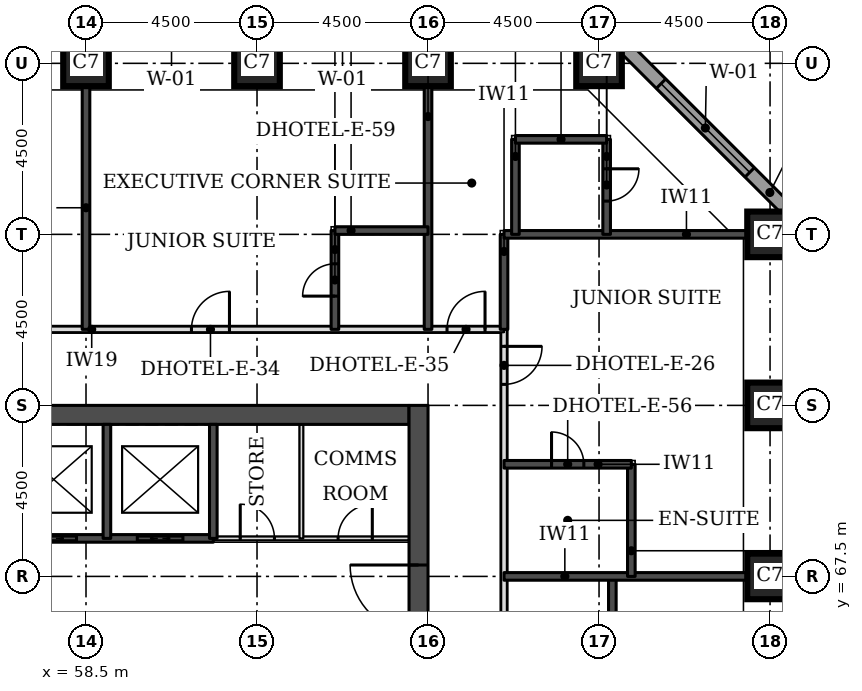
"""IFC4 building model, lengths in metres.
Left out: names, types, materials, properties, quantities, classifications, styles, units other than length and angle.
Written with IfcOpenShell. Run it as: python <this file> out.ifc"""

import sys

from ifc_helpers import new_model, si_unit, direction, frame, frame_2d, origin, origin_2d, place, context, subcontext, project, spatial, rectangle, extrude, element, fill, save


model = new_model("IFC4")
c1 = context("Model", 3, precision=1e-05, world=origin(), true_north=direction((0.0, 1.0)))
c2 = subcontext(c1, "Body", "Model", "MODEL_VIEW")
j1 = project(units=[si_unit("LENGTHUNIT", "METRE"), si_unit("PLANEANGLEUNIT", "RADIAN")], contexts=[c1])
p1 = place(None, origin())
s1 = spatial("IfcSite", under=j1, at=p1, CompositionType="ELEMENT")
p2 = place(p1, origin())
s2 = spatial("IfcBuilding", under=s1, at=p2, CompositionType="ELEMENT")
p3 = place(p2, frame((0.0, 0.0, 62.7)))
s3 = spatial("IfcBuildingStorey", under=s2, at=p3, CompositionType="ELEMENT", Elevation=62.7)
for number, where, z_axis, x_axis in (
    (1, (76.5, 67.5, 0.0), (0.0, 0.0, 1.0), (1.0, 0.0, 0.0)),
    (2, (76.5, 72.0, 0.0), (0.0, 0.0, 1.0), (1.0, 0.0, 0.0)),
    (3, (76.5, 76.5, 0.0), (0.0, 0.0, 1.0), (1.0, 0.0, 0.0)),
    (4, (58.5, 81.0, 0.0), (0.0, 0.0, 1.0), (1.0, 0.0, 0.0)),
    (5, (63.0, 81.0, 0.0), (0.0, 0.0, 1.0), (1.0, 0.0, 0.0)),
    (6, (67.5, 81.0, 0.0), (0.0, 0.0, 1.0), (1.0, 0.0, 0.0)),
    (7, (72.0, 81.0, 0.0), (0.0, 0.0, 1.0), (1.0, 0.0, 0.0)),
):
    element("IfcColumn", number, at=place(p3, frame(where, z_axis=z_axis, x_axis=x_axis)), inside=s3, PredefinedType="COLUMN", context=c2, shape_type="SweptSolid", body=[
        extrude(rectangle(XDim=1.2, YDim=1.2, at=origin_2d()), origin(), (0.0, 0.0, 1.0), 3.3),
    ])
p4 = place(p3, frame((45.5, 71.75, 0.0), z_axis=(0.0, 0.0, 1.0), x_axis=(1.0, 0.0, 0.0)))
e8 = element("IfcWall", 8, at=p4, inside=s3, PredefinedType="SHEAR", context=c2, shape_type="SweptSolid", body=[
    extrude(rectangle(XDim=21.5, YDim=0.5, at=frame_2d((10.75, 0.0))), origin(), (0.0, 0.0, 1.0), 3.3),
])
p5 = place(p3, frame((67.25, 49.5, 0.0), z_axis=(0.0, 0.0, 1.0), x_axis=(0.0, 1.0, 0.0)))
e9 = element("IfcWall", 9, at=p5, inside=s3, PredefinedType="SHEAR", context=c2, shape_type="SweptSolid", body=[
    extrude(rectangle(XDim=22.5, YDim=0.5, at=frame_2d((11.25, 0.0))), origin(), (0.0, 0.0, 1.0), 3.3),
])
p6 = place(p5, frame((4.2, 0.0, 0.0)))
e10 = element("IfcOpeningElement", 10, at=p6, cuts=e9, PredefinedType="OPENING", context=c2, shape_type="SweptSolid", body=[
    extrude(rectangle(XDim=1.8, YDim=2.1, at=frame_2d((0.9, 1.05))), frame((0.0, 0.26, 0.0), z_axis=(0.0, -1.0, 0.0), x_axis=(1.0, 0.0, 0.0)), (0.0, 0.0, 1.0), 0.52),
])
p7 = place(p5, frame((6.9, 0.0, 0.0)))
e11 = element("IfcOpeningElement", 11, at=p7, cuts=e9, PredefinedType="OPENING", context=c2, shape_type="SweptSolid", body=[
    extrude(rectangle(XDim=1.1, YDim=2.1, at=frame_2d((0.55, 1.05))), frame((0.0, 0.26, 0.0), z_axis=(0.0, -1.0, 0.0), x_axis=(1.0, 0.0, 0.0)), (0.0, 0.0, 1.0), 0.52),
])
p8 = place(p5, frame((13.6, 0.0, 0.0)))
e12 = element("IfcOpeningElement", 12, at=p8, cuts=e9, PredefinedType="OPENING", context=c2, shape_type="SweptSolid", body=[
    extrude(rectangle(XDim=1.1, YDim=2.1, at=frame_2d((0.55, 1.05))), frame((0.0, 0.26, 0.0), z_axis=(0.0, -1.0, 0.0), x_axis=(1.0, 0.0, 0.0)), (0.0, 0.0, 1.0), 0.52),
])
p9 = place(p5, frame((16.5, 0.0, 0.0)))
e13 = element("IfcOpeningElement", 13, at=p9, cuts=e9, PredefinedType="OPENING", context=c2, shape_type="SweptSolid", body=[
    extrude(rectangle(XDim=1.8, YDim=2.1, at=frame_2d((0.9, 1.05))), frame((0.0, 0.26, 0.0), z_axis=(0.0, -1.0, 0.0), x_axis=(1.0, 0.0, 0.0)), (0.0, 0.0, 1.0), 0.52),
])
p10 = place(p3, frame((77.326, 76.77, 0.0), z_axis=(0.0, 0.0, 1.0), x_axis=(-0.707106781187, 0.707106781187, 0.0)))
e14 = element("IfcWall", 14, at=p10, inside=s3, PredefinedType="STANDARD", context=c2, shape_type="SweptSolid", body=[
    extrude(rectangle(XDim=7.151, YDim=0.35, at=frame_2d((3.576, 0.0))), origin(), (0.0, 0.0, 1.0), 3.055),
])
p11 = place(p10, frame((1.926, 0.0, 0.8)))
e15 = element("IfcOpeningElement", 15, at=p11, cuts=e14, PredefinedType="OPENING", context=c2, shape_type="SweptSolid", body=[
    extrude(rectangle(XDim=3.3, YDim=1.5, at=frame_2d((1.65, 0.75))), frame((0.0, 0.185, 0.0), z_axis=(0.0, -1.0, 0.0), x_axis=(1.0, 0.0, 0.0)), (0.0, 0.0, 1.0), 0.37),
])
p12 = place(p3, frame((69.5, 47.5, 0.0), z_axis=(0.0, 0.0, 1.0), x_axis=(0.0, 1.0, 0.0)))
e16 = element("IfcWall", 16, at=p12, inside=s3, PredefinedType="PARTITIONING", context=c2, shape_type="SweptSolid", body=[
    extrude(rectangle(XDim=26.5, YDim=0.15, at=frame_2d((13.25, 0.0))), origin(), (0.0, 0.0, 1.0), 3.08),
])
p13 = place(p12, frame((25.053, 0.0, 0.0)))
e17 = element("IfcOpeningElement", 17, at=p13, cuts=e16, PredefinedType="OPENING", context=c2, shape_type="SweptSolid", body=[
    extrude(rectangle(XDim=1.0, YDim=2.1, at=frame_2d((0.5, 1.05))), frame((0.0, 0.085, 0.0), z_axis=(0.0, -1.0, 0.0), x_axis=(1.0, 0.0, 0.0)), (0.0, 0.0, 1.0), 0.17),
])
p14 = place(p12, frame((13.775, 0.0, 0.0)))
e18 = element("IfcOpeningElement", 18, at=p14, cuts=e16, PredefinedType="OPENING", context=c2, shape_type="SweptSolid", body=[
    extrude(rectangle(XDim=1.0, YDim=2.1, at=frame_2d((0.5, 1.05))), frame((0.0, 0.085, 0.0), z_axis=(0.0, -1.0, 0.0), x_axis=(1.0, 0.0, 0.0)), (0.0, 0.0, 1.0), 0.17),
])
p15 = place(p12, frame((7.65, 0.0, 0.0)))
e19 = element("IfcOpeningElement", 19, at=p15, cuts=e16, PredefinedType="OPENING", context=c2, shape_type="SweptSolid", body=[
    extrude(rectangle(XDim=1.1, YDim=2.1, at=frame_2d((0.55, 1.05))), frame((0.0, 0.085, 0.0), z_axis=(0.0, -1.0, 0.0), x_axis=(1.0, 0.0, 0.0)), (0.0, 0.0, 1.0), 0.17),
])
p16 = place(p12, frame((0.447, 0.0, 0.0)))
e20 = element("IfcOpeningElement", 20, at=p16, cuts=e16, PredefinedType="OPENING", context=c2, shape_type="SweptSolid", body=[
    extrude(rectangle(XDim=1.0, YDim=2.1, at=frame_2d((0.5, 1.05))), frame((0.0, 0.085, 0.0), z_axis=(0.0, -1.0, 0.0), x_axis=(1.0, 0.0, 0.0)), (0.0, 0.0, 1.0), 0.17),
])
p17 = place(p3, frame((43.0, 74.0, 0.0), z_axis=(0.0, 0.0, 1.0), x_axis=(1.0, 0.0, 0.0)))
e21 = element("IfcWall", 21, at=p17, inside=s3, PredefinedType="PARTITIONING", context=c2, shape_type="SweptSolid", body=[
    extrude(rectangle(XDim=26.5, YDim=0.15, at=frame_2d((13.25, 0.0))), origin(), (0.0, 0.0, 1.0), 3.08),
])
p18 = place(p17, frame((2.825, 0.0, 0.0)))
e22 = element("IfcOpeningElement", 22, at=p18, cuts=e21, PredefinedType="OPENING", context=c2, shape_type="SweptSolid", body=[
    extrude(rectangle(XDim=1.0, YDim=2.1, at=frame_2d((0.5, 1.05))), frame((0.0, 0.085, 0.0), z_axis=(0.0, -1.0, 0.0), x_axis=(1.0, 0.0, 0.0)), (0.0, 0.0, 1.0), 0.17),
])
p19 = place(p17, frame((11.975, 0.0, 0.0)))
e23 = element("IfcOpeningElement", 23, at=p19, cuts=e21, PredefinedType="OPENING", context=c2, shape_type="SweptSolid", body=[
    extrude(rectangle(XDim=1.0, YDim=2.1, at=frame_2d((0.5, 1.05))), frame((0.0, 0.085, 0.0), z_axis=(0.0, -1.0, 0.0), x_axis=(1.0, 0.0, 0.0)), (0.0, 0.0, 1.0), 0.17),
])
p20 = place(p17, frame((18.275, 0.0, 0.0)))
e24 = element("IfcOpeningElement", 24, at=p20, cuts=e21, PredefinedType="OPENING", context=c2, shape_type="SweptSolid", body=[
    extrude(rectangle(XDim=1.0, YDim=2.1, at=frame_2d((0.5, 1.05))), frame((0.0, 0.085, 0.0), z_axis=(0.0, -1.0, 0.0), x_axis=(1.0, 0.0, 0.0)), (0.0, 0.0, 1.0), 0.17),
])
p21 = place(p17, frame((0.5, 0.0, 0.0)))
e25 = element("IfcOpeningElement", 25, at=p21, cuts=e21, PredefinedType="OPENING", context=c2, shape_type="SweptSolid", body=[
    extrude(rectangle(XDim=1.0, YDim=2.1, at=frame_2d((0.5, 1.05))), frame((0.0, 0.085, 0.0), z_axis=(0.0, -1.0, 0.0), x_axis=(1.0, 0.0, 0.0)), (0.0, 0.0, 1.0), 0.17),
])
p22 = place(p17, frame((25.0, 0.0, 0.0)))
e26 = element("IfcOpeningElement", 26, at=p22, cuts=e21, PredefinedType="OPENING", context=c2, shape_type="SweptSolid", body=[
    extrude(rectangle(XDim=1.0, YDim=2.1, at=frame_2d((0.5, 1.05))), frame((0.0, 0.085, 0.0), z_axis=(0.0, -1.0, 0.0), x_axis=(1.0, 0.0, 0.0)), (0.0, 0.0, 1.0), 0.17),
])
p23 = place(p3, frame((72.35, 65.05, 0.0), z_axis=(0.0, 0.0, 1.0), x_axis=(0.0, 1.0, 0.0)))
e27 = element("IfcWall", 27, at=p23, inside=s3, PredefinedType="SOLIDWALL", context=c2, shape_type="SweptSolid", body=[
    extrude(rectangle(XDim=2.45, YDim=0.2, at=frame_2d((1.225, 0.0))), origin(), (0.0, 0.0, 1.0), 3.08),
])
p24 = place(p3, frame((69.5, 67.5, 0.0), z_axis=(0.0, 0.0, 1.0), x_axis=(1.0, 0.0, 0.0)))
e28 = element("IfcWall", 28, at=p24, inside=s3, PredefinedType="SOLIDWALL", context=c2, shape_type="SweptSolid", body=[
    extrude(rectangle(XDim=6.4, YDim=0.2, at=frame_2d((3.2, 0.0))), origin(), (0.0, 0.0, 1.0), 3.08),
])
p25 = place(p3, frame((72.85, 67.5, 0.0), z_axis=(0.0, 0.0, 1.0), x_axis=(0.0, 1.0, 0.0)))
e29 = element("IfcWall", 29, at=p25, inside=s3, PredefinedType="SOLIDWALL", context=c2, shape_type="SweptSolid", body=[
    extrude(rectangle(XDim=2.95, YDim=0.2, at=frame_2d((1.475, 0.0))), origin(), (0.0, 0.0, 1.0), 3.08),
])
p26 = place(p3, frame((69.5, 70.45, 0.0), z_axis=(0.0, 0.0, 1.0), x_axis=(1.0, 0.0, 0.0)))
e30 = element("IfcWall", 30, at=p26, inside=s3, PredefinedType="SOLIDWALL", context=c2, shape_type="SweptSolid", body=[
    extrude(rectangle(XDim=3.35, YDim=0.2, at=frame_2d((1.675, 0.0))), origin(), (0.0, 0.0, 1.0), 3.08),
])
p27 = place(p26, frame((1.25, 0.0, 0.0)))
e31 = element("IfcOpeningElement", 31, at=p27, cuts=e30, PredefinedType="OPENING", context=c2, shape_type="SweptSolid", body=[
    extrude(rectangle(XDim=0.85, YDim=2.1, at=frame_2d((0.425, 1.05))), frame((0.0, 0.11, 0.0), z_axis=(0.0, -1.0, 0.0), x_axis=(1.0, 0.0, 0.0)), (0.0, 0.0, 1.0), 0.22),
])
p28 = place(p3, frame((58.5, 74.0, 0.0), z_axis=(0.0, 0.0, 1.0), x_axis=(0.0, 1.0, 0.0)))
e32 = element("IfcWall", 32, at=p28, inside=s3, PredefinedType="SOLIDWALL", context=c2, shape_type="SweptSolid", body=[
    extrude(rectangle(XDim=6.4, YDim=0.2, at=frame_2d((3.2, 0.0))), origin(), (0.0, 0.0, 1.0), 3.08),
])
p29 = place(p3, frame((65.05, 74.0, 0.0), z_axis=(0.0, 0.0, 1.0), x_axis=(0.0, 1.0, 0.0)))
e33 = element("IfcWall", 33, at=p29, inside=s3, PredefinedType="SOLIDWALL", context=c2, shape_type="SweptSolid", body=[
    extrude(rectangle(XDim=2.6, YDim=0.2, at=frame_2d((1.3, 0.0))), origin(), (0.0, 0.0, 1.0), 3.08),
])
p30 = place(p29, frame((0.875, 0.0, 0.0)))
e34 = element("IfcOpeningElement", 34, at=p30, cuts=e33, PredefinedType="OPENING", context=c2, shape_type="SweptSolid", body=[
    extrude(rectangle(XDim=0.85, YDim=2.1, at=frame_2d((0.425, 1.05))), frame((0.0, 0.11, 0.0), z_axis=(0.0, -1.0, 0.0), x_axis=(1.0, 0.0, 0.0)), (0.0, 0.0, 1.0), 0.22),
])
p31 = place(p3, frame((67.5, 74.0, 0.0), z_axis=(0.0, 0.0, 1.0), x_axis=(0.0, 1.0, 0.0)))
e35 = element("IfcWall", 35, at=p31, inside=s3, PredefinedType="SOLIDWALL", context=c2, shape_type="SweptSolid", body=[
    extrude(rectangle(XDim=6.4, YDim=0.2, at=frame_2d((3.2, 0.0))), origin(), (0.0, 0.0, 1.0), 3.08),
])
p32 = place(p3, frame((69.5, 74.0, 0.0), z_axis=(0.0, 0.0, 1.0), x_axis=(0.0, 1.0, 0.0)))
e36 = element("IfcWall", 36, at=p32, inside=s3, PredefinedType="SOLIDWALL", context=c2, shape_type="SweptSolid", body=[
    extrude(rectangle(XDim=2.5, YDim=0.2, at=frame_2d((1.25, 0.0))), origin(), (0.0, 0.0, 1.0), 3.08),
])
p33 = place(p3, frame((69.5, 76.5, 0.0), z_axis=(0.0, 0.0, 1.0), x_axis=(1.0, 0.0, 0.0)))
e37 = element("IfcWall", 37, at=p33, inside=s3, PredefinedType="SOLIDWALL", context=c2, shape_type="SweptSolid", body=[
    extrude(rectangle(XDim=6.4, YDim=0.2, at=frame_2d((3.2, 0.0))), origin(), (0.0, 0.0, 1.0), 3.08),
])
p34 = place(p3, frame((69.8, 76.5, 0.0), z_axis=(0.0, 0.0, 1.0), x_axis=(0.0, 1.0, 0.0)))
e38 = element("IfcWall", 38, at=p34, inside=s3, PredefinedType="SOLIDWALL", context=c2, shape_type="SweptSolid", body=[
    extrude(rectangle(XDim=2.5, YDim=0.2, at=frame_2d((1.25, 0.0))), origin(), (0.0, 0.0, 1.0), 3.08),
])
p35 = place(p3, frame((72.2, 76.5, 0.0), z_axis=(0.0, 0.0, 1.0), x_axis=(0.0, 1.0, 0.0)))
e39 = element("IfcWall", 39, at=p35, inside=s3, PredefinedType="SOLIDWALL", context=c2, shape_type="SweptSolid", body=[
    extrude(rectangle(XDim=2.5, YDim=0.2, at=frame_2d((1.25, 0.0))), origin(), (0.0, 0.0, 1.0), 3.08),
])
p36 = place(p35, frame((0.875, 0.0, 0.0)))
e40 = element("IfcOpeningElement", 40, at=p36, cuts=e39, PredefinedType="OPENING", context=c2, shape_type="SweptSolid", body=[
    extrude(rectangle(XDim=0.85, YDim=2.1, at=frame_2d((0.425, 1.05))), frame((0.0, 0.11, 0.0), z_axis=(0.0, -1.0, 0.0), x_axis=(1.0, 0.0, 0.0)), (0.0, 0.0, 1.0), 0.22),
])
p37 = place(p3, frame((65.05, 76.6, 0.0), z_axis=(0.0, 0.0, 1.0), x_axis=(1.0, 0.0, 0.0)))
e41 = element("IfcWall", 41, at=p37, inside=s3, PredefinedType="SOLIDWALL", context=c2, shape_type="SweptSolid", body=[
    extrude(rectangle(XDim=2.45, YDim=0.2, at=frame_2d((1.225, 0.0))), origin(), (0.0, 0.0, 1.0), 3.08),
])
p38 = place(p3, frame((69.8, 79.0, 0.0), z_axis=(0.0, 0.0, 1.0), x_axis=(1.0, 0.0, 0.0)))
e42 = element("IfcWall", 42, at=p38, inside=s3, PredefinedType="SOLIDWALL", context=c2, shape_type="SweptSolid", body=[
    extrude(rectangle(XDim=2.4, YDim=0.2, at=frame_2d((1.2, 0.0))), origin(), (0.0, 0.0, 1.0), 3.08),
])
p39 = place(p3, frame((61.85, 68.5, 0.0), z_axis=(0.0, 0.0, 1.0), x_axis=(1.0, 0.0, 0.0)))
e43 = element("IfcWall", 43, at=p39, inside=s3, PredefinedType="PARTITIONING", context=c2, shape_type="SweptSolid", body=[
    extrude(rectangle(XDim=5.15, YDim=0.1, at=frame_2d((2.575, 0.0))), origin(), (0.0, 0.0, 1.0), 3.08),
])
p40 = place(p39, frame((3.284, 0.0, 0.0)))
e44 = element("IfcOpeningElement", 44, at=p40, cuts=e43, PredefinedType="OPENING", context=c2, shape_type="SweptSolid", body=[
    extrude(rectangle(XDim=0.9, YDim=2.1, at=frame_2d((0.45, 1.05))), frame((0.0, 0.06, 0.0), z_axis=(0.0, -1.0, 0.0), x_axis=(1.0, 0.0, 0.0)), (0.0, 0.0, 1.0), 0.12),
])
p41 = place(p39, frame((0.709, 0.0, 0.0)))
e45 = element("IfcOpeningElement", 45, at=p41, cuts=e43, PredefinedType="OPENING", context=c2, shape_type="SweptSolid", body=[
    extrude(rectangle(XDim=0.9, YDim=2.1, at=frame_2d((0.45, 1.05))), frame((0.0, 0.06, 0.0), z_axis=(0.0, -1.0, 0.0), x_axis=(1.0, 0.0, 0.0)), (0.0, 0.0, 1.0), 0.12),
])
p42 = place(p3, frame((50.65, 68.5, 0.0), z_axis=(0.0, 0.0, 1.0), x_axis=(1.0, 0.0, 0.0)))
e46 = element("IfcWall", 46, at=p42, inside=s3, PredefinedType="SOLIDWALL", context=c2, shape_type="SweptSolid", body=[
    extrude(rectangle(XDim=11.2, YDim=0.2, at=frame_2d((5.6, 0.0))), origin(), (0.0, 0.0, 1.0), 3.08),
])
p43 = place(p42, frame((0.8, 0.0, 0.0)))
e47 = element("IfcOpeningElement", 47, at=p43, cuts=e46, PredefinedType="OPENING", context=c2, shape_type="SweptSolid", body=[
    extrude(rectangle(XDim=1.2, YDim=2.1, at=frame_2d((0.6, 1.05))), frame((0.0, 0.11, 0.0), z_axis=(0.0, -1.0, 0.0), x_axis=(1.0, 0.0, 0.0)), (0.0, 0.0, 1.0), 0.22),
])
p44 = place(p42, frame((3.6, 0.0, 0.0)))
e48 = element("IfcOpeningElement", 48, at=p44, cuts=e46, PredefinedType="OPENING", context=c2, shape_type="SweptSolid", body=[
    extrude(rectangle(XDim=1.2, YDim=2.1, at=frame_2d((0.6, 1.05))), frame((0.0, 0.11, 0.0), z_axis=(0.0, -1.0, 0.0), x_axis=(1.0, 0.0, 0.0)), (0.0, 0.0, 1.0), 0.22),
])
p45 = place(p42, frame((6.4, 0.0, 0.0)))
e49 = element("IfcOpeningElement", 49, at=p45, cuts=e46, PredefinedType="OPENING", context=c2, shape_type="SweptSolid", body=[
    extrude(rectangle(XDim=1.2, YDim=2.1, at=frame_2d((0.6, 1.05))), frame((0.0, 0.11, 0.0), z_axis=(0.0, -1.0, 0.0), x_axis=(1.0, 0.0, 0.0)), (0.0, 0.0, 1.0), 0.22),
])
p46 = place(p42, frame((9.2, 0.0, 0.0)))
e50 = element("IfcOpeningElement", 50, at=p46, cuts=e46, PredefinedType="OPENING", context=c2, shape_type="SweptSolid", body=[
    extrude(rectangle(XDim=1.2, YDim=2.1, at=frame_2d((0.6, 1.05))), frame((0.0, 0.11, 0.0), z_axis=(0.0, -1.0, 0.0), x_axis=(1.0, 0.0, 0.0)), (0.0, 0.0, 1.0), 0.22),
])
for number, where, z_axis, x_axis in (
    (51, (59.05, 68.5, 0.0), (0.0, 0.0, 1.0), (0.0, 1.0, 0.0)),
    (52, (61.85, 68.5, 0.0), (0.0, 0.0, 1.0), (0.0, 1.0, 0.0)),
):
    element("IfcWall", number, at=place(p3, frame(where, z_axis=z_axis, x_axis=x_axis)), inside=s3, PredefinedType="SOLIDWALL", context=c2, shape_type="SweptSolid", body=[
        extrude(rectangle(XDim=3.0, YDim=0.2, at=frame_2d((1.5, 0.0))), origin(), (0.0, 0.0, 1.0), 3.08),
    ])
p47 = place(p3, frame((64.167, 68.5, 0.0), z_axis=(0.0, 0.0, 1.0), x_axis=(0.0, 1.0, 0.0)))
e53 = element("IfcWall", 53, at=p47, inside=s3, PredefinedType="PARTITIONING", context=c2, shape_type="SweptSolid", body=[
    extrude(rectangle(XDim=3.0, YDim=0.1, at=frame_2d((1.5, 0.0))), origin(), (0.0, 0.0, 1.0), 3.08),
])
p48 = place(p11, origin())
e54 = element("IfcWindow", 54, at=p48, inside=s3, PartitioningType="SINGLE_PANEL", PredefinedType="WINDOW", context=c2, shape_type="SweptSolid", body=[
    extrude(rectangle(XDim=3.3, YDim=1.5, at=frame_2d((1.65, 0.75))), frame((0.0, 0.085, 0.0), z_axis=(0.0, -1.0, 0.0), x_axis=(1.0, 0.0, 0.0)), (0.0, 0.0, 1.0), 0.06),
])
fill(e15, e54)
p49 = place(p20, origin())
e55 = element("IfcDoor", 55, at=p49, inside=s3, OperationType="SINGLE_SWING_RIGHT", PredefinedType="DOOR", context=c2, shape_type="SweptSolid", body=[
    extrude(rectangle(XDim=1.0, YDim=2.1, at=frame_2d((0.5, 1.05))), frame((0.0, 0.025, 0.0), z_axis=(0.0, -1.0, 0.0), x_axis=(1.0, 0.0, 0.0)), (0.0, 0.0, 1.0), 0.05),
])
fill(e24, e55)
p50 = place(p30, origin())
e56 = element("IfcDoor", 56, at=p50, inside=s3, OperationType="SINGLE_SWING_LEFT", PredefinedType="DOOR", context=c2, shape_type="SweptSolid", body=[
    extrude(rectangle(XDim=0.85, YDim=2.1, at=frame_2d((0.425, 1.05))), frame((0.0, 0.025, 0.0), z_axis=(0.0, -1.0, 0.0), x_axis=(1.0, 0.0, 0.0)), (0.0, 0.0, 1.0), 0.05),
])
fill(e34, e56)
p51 = place(p13, frame((1.0, 0.0, 0.0), z_axis=(0.0, 0.0, 1.0), x_axis=(-1.0, 0.0, 0.0)))
e57 = element("IfcDoor", 57, at=p51, inside=s3, OperationType="SINGLE_SWING_LEFT", PredefinedType="DOOR", context=c2, shape_type="SweptSolid", body=[
    extrude(rectangle(XDim=1.0, YDim=2.1, at=frame_2d((0.5, 1.05))), frame((0.0, 0.025, 0.0), z_axis=(0.0, -1.0, 0.0), x_axis=(1.0, 0.0, 0.0)), (0.0, 0.0, 1.0), 0.05),
])
fill(e17, e57)
p52 = place(p27, origin())
e58 = element("IfcDoor", 58, at=p52, inside=s3, OperationType="SINGLE_SWING_LEFT", PredefinedType="DOOR", context=c2, shape_type="SweptSolid", body=[
    extrude(rectangle(XDim=0.85, YDim=2.1, at=frame_2d((0.425, 1.05))), frame((0.0, 0.025, 0.0), z_axis=(0.0, -1.0, 0.0), x_axis=(1.0, 0.0, 0.0)), (0.0, 0.0, 1.0), 0.05),
])
fill(e31, e58)
p53 = place(p22, origin())
e59 = element("IfcDoor", 59, at=p53, inside=s3, OperationType="SINGLE_SWING_RIGHT", PredefinedType="DOOR", context=c2, shape_type="SweptSolid", body=[
    extrude(rectangle(XDim=1.0, YDim=2.1, at=frame_2d((0.5, 1.05))), frame((0.0, 0.025, 0.0), z_axis=(0.0, -1.0, 0.0), x_axis=(1.0, 0.0, 0.0)), (0.0, 0.0, 1.0), 0.05),
])
fill(e26, e59)
p54 = place(p36, frame((0.85, 0.0, 0.0), z_axis=(0.0, 0.0, 1.0), x_axis=(-1.0, 0.0, 0.0)))
e60 = element("IfcDoor", 60, at=p54, inside=s3, OperationType="SINGLE_SWING_LEFT", PredefinedType="DOOR", context=c2, shape_type="SweptSolid", body=[
    extrude(rectangle(XDim=0.85, YDim=2.1, at=frame_2d((0.425, 1.05))), frame((0.0, 0.025, 0.0), z_axis=(0.0, -1.0, 0.0), x_axis=(1.0, 0.0, 0.0)), (0.0, 0.0, 1.0), 0.05),
])
fill(e40, e60)
p55 = place(p45, origin())
e61 = element("IfcDoor", 61, at=p55, inside=s3, OperationType="DOUBLE_DOOR_SLIDING", PredefinedType="DOOR", context=c2, shape_type="SweptSolid", body=[
    extrude(rectangle(XDim=1.2, YDim=2.1, at=frame_2d((0.6, 1.05))), frame((0.0, 0.025, 0.0), z_axis=(0.0, -1.0, 0.0), x_axis=(1.0, 0.0, 0.0)), (0.0, 0.0, 1.0), 0.05),
])
fill(e49, e61)
p56 = place(p46, origin())
e62 = element("IfcDoor", 62, at=p56, inside=s3, OperationType="DOUBLE_DOOR_SLIDING", PredefinedType="DOOR", context=c2, shape_type="SweptSolid", body=[
    extrude(rectangle(XDim=1.2, YDim=2.1, at=frame_2d((0.6, 1.05))), frame((0.0, 0.025, 0.0), z_axis=(0.0, -1.0, 0.0), x_axis=(1.0, 0.0, 0.0)), (0.0, 0.0, 1.0), 0.05),
])
fill(e50, e62)
p57 = place(p9, origin())
e63 = element("IfcDoor", 63, at=p57, inside=s3, OperationType="SINGLE_SWING_RIGHT", PredefinedType="DOOR", context=c2, shape_type="SweptSolid", body=[
    extrude(rectangle(XDim=1.8, YDim=2.1, at=frame_2d((0.9, 1.05))), frame((0.0, 0.025, 0.0), z_axis=(0.0, -1.0, 0.0), x_axis=(1.0, 0.0, 0.0)), (0.0, 0.0, 1.0), 0.05),
])
fill(e13, e63)
p58 = place(p40, origin())
e64 = element("IfcDoor", 64, at=p58, inside=s3, OperationType="SINGLE_SWING_RIGHT", PredefinedType="DOOR", context=c2, shape_type="SweptSolid", body=[
    extrude(rectangle(XDim=0.9, YDim=2.1, at=frame_2d((0.45, 1.05))), frame((0.0, 0.025, 0.0), z_axis=(0.0, -1.0, 0.0), x_axis=(1.0, 0.0, 0.0)), (0.0, 0.0, 1.0), 0.05),
])
fill(e44, e64)
p59 = place(p41, origin())
e65 = element("IfcDoor", 65, at=p59, inside=s3, OperationType="SINGLE_SWING_LEFT", PredefinedType="DOOR", context=c2, shape_type="SweptSolid", body=[
    extrude(rectangle(XDim=0.9, YDim=2.1, at=frame_2d((0.45, 1.05))), frame((0.0, 0.025, 0.0), z_axis=(0.0, -1.0, 0.0), x_axis=(1.0, 0.0, 0.0)), (0.0, 0.0, 1.0), 0.05),
])
fill(e45, e65)
save(model, sys.argv[1])
